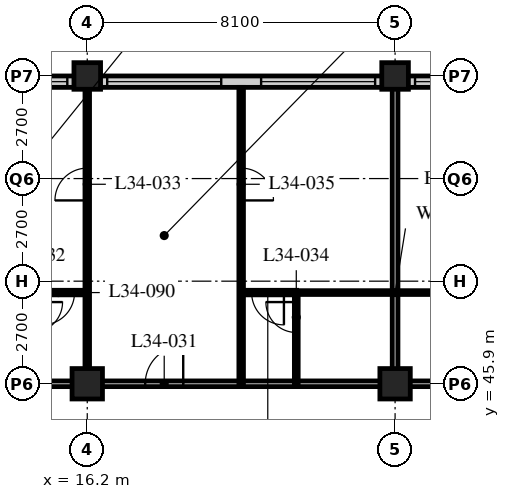
"""IFC4 building model, lengths in metres.
Left out: names, types, materials, properties, quantities, classifications, styles, units other than length and angle.
Written with IfcOpenShell. Run it as: python <this file> out.ifc"""

import sys

from ifc_helpers import new_model, si_unit, direction, frame, frame_2d, origin, origin_2d, place, context, subcontext, project, spatial, rectangle, hollow_rectangle, extrude, element, fill, save


model = new_model("IFC4")
c1 = context("Model", 3, precision=1e-05, world=origin(), true_north=direction((0.0, 1.0)))
c2 = subcontext(c1, "Body", "Model", "MODEL_VIEW")
j1 = project(units=[si_unit("LENGTHUNIT", "METRE"), si_unit("PLANEANGLEUNIT", "RADIAN")], contexts=[c1])
p1 = place(None, origin())
s1 = spatial("IfcSite", under=j1, at=p1, CompositionType="ELEMENT")
p2 = place(p1, origin())
s2 = spatial("IfcBuilding", under=s1, at=p2, CompositionType="ELEMENT")
p3 = place(p2, frame((0.0, 0.0, 134.0)))
s3 = spatial("IfcBuildingStorey", under=s2, at=p3, CompositionType="ELEMENT", Elevation=134.0)
p4 = place(p3, frame((16.2, 45.9, 0.0), z_axis=(0.0, 0.0, 1.0), x_axis=(1.0, 0.0, 0.0)))
e1 = element("IfcColumn", 1, at=p4, inside=s3, PredefinedType="COLUMN", context=c2, shape_type="SweptSolid", body=[
    extrude(hollow_rectangle(XDim=0.8, YDim=0.8, WallThickness=0.08, at=origin_2d()), origin(), (0.0, 0.0, 1.0), 3.4),
])
p5 = place(p3, frame((16.2, 54.0, 0.0), z_axis=(0.0, 0.0, 1.0), x_axis=(1.0, 0.0, 0.0)))
e2 = element("IfcColumn", 2, at=p5, inside=s3, PredefinedType="COLUMN", context=c2, shape_type="SweptSolid", body=[
    extrude(hollow_rectangle(XDim=0.7, YDim=0.7, WallThickness=0.07, at=origin_2d()), origin(), (0.0, 0.0, 1.0), 3.4),
])
p6 = place(p3, frame((24.3, 45.9, 0.0), z_axis=(0.0, 0.0, 1.0), x_axis=(1.0, 0.0, 0.0)))
e3 = element("IfcColumn", 3, at=p6, inside=s3, PredefinedType="COLUMN", context=c2, shape_type="SweptSolid", body=[
    extrude(hollow_rectangle(XDim=0.8, YDim=0.8, WallThickness=0.08, at=origin_2d()), origin(), (0.0, 0.0, 1.0), 3.4),
])
p7 = place(p3, frame((24.3, 54.0, 0.0), z_axis=(0.0, 0.0, 1.0), x_axis=(1.0, 0.0, 0.0)))
e4 = element("IfcColumn", 4, at=p7, inside=s3, PredefinedType="COLUMN", context=c2, shape_type="SweptSolid", body=[
    extrude(hollow_rectangle(XDim=0.7, YDim=0.7, WallThickness=0.07, at=origin_2d()), origin(), (0.0, 0.0, 1.0), 3.4),
])
p8 = place(p3, frame((48.3, 53.85, 0.0), z_axis=(0.0, 0.0, 1.0), x_axis=(-1.0, 0.0, 0.0)))
e5 = element("IfcWall", 5, at=p8, inside=s3, PredefinedType="SOLIDWALL", context=c2, shape_type="SweptSolid", body=[
    extrude(rectangle(XDim=40.2, YDim=0.3, at=frame_2d((20.1, 0.0))), origin(), (0.0, 0.0, 1.0), 3.19),
])
p9 = place(p8, frame((0.225, 0.0, 0.9)))
e6 = element("IfcOpeningElement", 6, at=p9, cuts=e5, PredefinedType="OPENING", context=c2, shape_type="SweptSolid", body=[
    extrude(rectangle(XDim=3.0, YDim=2.0, at=frame_2d((1.5, 1.0))), frame((0.0, 0.16, 0.0), z_axis=(0.0, -1.0, 0.0), x_axis=(1.0, 0.0, 0.0)), (0.0, 0.0, 1.0), 0.32),
])
p10 = place(p8, frame((4.275, 0.0, 0.9)))
e7 = element("IfcOpeningElement", 7, at=p10, cuts=e5, PredefinedType="OPENING", context=c2, shape_type="SweptSolid", body=[
    extrude(rectangle(XDim=3.0, YDim=2.0, at=frame_2d((1.5, 1.0))), frame((0.0, 0.16, 0.0), z_axis=(0.0, -1.0, 0.0), x_axis=(1.0, 0.0, 0.0)), (0.0, 0.0, 1.0), 0.32),
])
p11 = place(p8, frame((8.325, 0.0, 0.9)))
e8 = element("IfcOpeningElement", 8, at=p11, cuts=e5, PredefinedType="OPENING", context=c2, shape_type="SweptSolid", body=[
    extrude(rectangle(XDim=3.0, YDim=2.0, at=frame_2d((1.5, 1.0))), frame((0.0, 0.16, 0.0), z_axis=(0.0, -1.0, 0.0), x_axis=(1.0, 0.0, 0.0)), (0.0, 0.0, 1.0), 0.32),
])
p12 = place(p8, frame((12.375, 0.0, 0.9)))
e9 = element("IfcOpeningElement", 9, at=p12, cuts=e5, PredefinedType="OPENING", context=c2, shape_type="SweptSolid", body=[
    extrude(rectangle(XDim=3.0, YDim=2.0, at=frame_2d((1.5, 1.0))), frame((0.0, 0.16, 0.0), z_axis=(0.0, -1.0, 0.0), x_axis=(1.0, 0.0, 0.0)), (0.0, 0.0, 1.0), 0.32),
])
p13 = place(p8, frame((16.425, 0.0, 0.9)))
e10 = element("IfcOpeningElement", 10, at=p13, cuts=e5, PredefinedType="OPENING", context=c2, shape_type="SweptSolid", body=[
    extrude(rectangle(XDim=3.0, YDim=2.0, at=frame_2d((1.5, 1.0))), frame((0.0, 0.16, 0.0), z_axis=(0.0, -1.0, 0.0), x_axis=(1.0, 0.0, 0.0)), (0.0, 0.0, 1.0), 0.32),
])
p14 = place(p8, frame((20.475, 0.0, 0.9)))
e11 = element("IfcOpeningElement", 11, at=p14, cuts=e5, PredefinedType="OPENING", context=c2, shape_type="SweptSolid", body=[
    extrude(rectangle(XDim=3.0, YDim=2.0, at=frame_2d((1.5, 1.0))), frame((0.0, 0.16, 0.0), z_axis=(0.0, -1.0, 0.0), x_axis=(1.0, 0.0, 0.0)), (0.0, 0.0, 1.0), 0.32),
])
p15 = place(p8, frame((24.525, 0.0, 0.9)))
e12 = element("IfcOpeningElement", 12, at=p15, cuts=e5, PredefinedType="OPENING", context=c2, shape_type="SweptSolid", body=[
    extrude(rectangle(XDim=3.0, YDim=2.0, at=frame_2d((1.5, 1.0))), frame((0.0, 0.16, 0.0), z_axis=(0.0, -1.0, 0.0), x_axis=(1.0, 0.0, 0.0)), (0.0, 0.0, 1.0), 0.32),
])
p16 = place(p8, frame((28.575, 0.0, 0.9)))
e13 = element("IfcOpeningElement", 13, at=p16, cuts=e5, PredefinedType="OPENING", context=c2, shape_type="SweptSolid", body=[
    extrude(rectangle(XDim=3.0, YDim=2.0, at=frame_2d((1.5, 1.0))), frame((0.0, 0.16, 0.0), z_axis=(0.0, -1.0, 0.0), x_axis=(1.0, 0.0, 0.0)), (0.0, 0.0, 1.0), 0.32),
])
p17 = place(p8, frame((32.625, 0.0, 0.9)))
e14 = element("IfcOpeningElement", 14, at=p17, cuts=e5, PredefinedType="OPENING", context=c2, shape_type="SweptSolid", body=[
    extrude(rectangle(XDim=3.0, YDim=2.0, at=frame_2d((1.5, 1.0))), frame((0.0, 0.16, 0.0), z_axis=(0.0, -1.0, 0.0), x_axis=(1.0, 0.0, 0.0)), (0.0, 0.0, 1.0), 0.32),
])
p18 = place(p8, frame((36.675, 0.0, 0.9)))
e15 = element("IfcOpeningElement", 15, at=p18, cuts=e5, PredefinedType="OPENING", context=c2, shape_type="SweptSolid", body=[
    extrude(rectangle(XDim=3.0, YDim=2.0, at=frame_2d((1.5, 1.0))), frame((0.0, 0.16, 0.0), z_axis=(0.0, -1.0, 0.0), x_axis=(1.0, 0.0, 0.0)), (0.0, 0.0, 1.0), 0.32),
])
p19 = place(p3, frame((8.1, 45.9, 0.0), z_axis=(0.0, 0.0, 1.0), x_axis=(1.0, 0.0, 0.0)))
e16 = element("IfcWall", 16, at=p19, inside=s3, PredefinedType="PARTITIONING", context=c2, shape_type="SweptSolid", body=[
    extrude(rectangle(XDim=36.45, YDim=0.15, at=frame_2d((18.225, 0.0))), origin(), (0.0, 0.0, 1.0), 2.578),
])
p20 = place(p19, frame((9.625, 0.0, 0.0)))
e17 = element("IfcOpeningElement", 17, at=p20, cuts=e16, PredefinedType="OPENING", context=c2, shape_type="SweptSolid", body=[
    extrude(rectangle(XDim=1.0, YDim=2.1, at=frame_2d((0.5, 1.05))), frame((0.0, 0.085, 0.0), z_axis=(0.0, -1.0, 0.0), x_axis=(1.0, 0.0, 0.0)), (0.0, 0.0, 1.0), 0.17),
])
p21 = place(p19, frame((21.775, 0.0, 0.0)))
e18 = element("IfcOpeningElement", 18, at=p21, cuts=e16, PredefinedType="OPENING", context=c2, shape_type="SweptSolid", body=[
    extrude(rectangle(XDim=1.0, YDim=2.1, at=frame_2d((0.5, 1.05))), frame((0.0, 0.085, 0.0), z_axis=(0.0, -1.0, 0.0), x_axis=(1.0, 0.0, 0.0)), (0.0, 0.0, 1.0), 0.17),
])
p22 = place(p19, frame((28.95, 0.0, 0.0)))
e19 = element("IfcOpeningElement", 19, at=p22, cuts=e16, PredefinedType="OPENING", context=c2, shape_type="SweptSolid", body=[
    extrude(rectangle(XDim=1.0, YDim=2.1, at=frame_2d((0.5, 1.05))), frame((0.0, 0.085, 0.0), z_axis=(0.0, -1.0, 0.0), x_axis=(1.0, 0.0, 0.0)), (0.0, 0.0, 1.0), 0.17),
])
p23 = place(p19, frame((33.925, 0.0, 0.0)))
e20 = element("IfcOpeningElement", 20, at=p23, cuts=e16, PredefinedType="OPENING", context=c2, shape_type="SweptSolid", body=[
    extrude(rectangle(XDim=1.0, YDim=2.1, at=frame_2d((0.5, 1.05))), frame((0.0, 0.085, 0.0), z_axis=(0.0, -1.0, 0.0), x_axis=(1.0, 0.0, 0.0)), (0.0, 0.0, 1.0), 0.17),
])
p24 = place(p19, frame((2.625, 0.0, 0.0)))
e21 = element("IfcOpeningElement", 21, at=p24, cuts=e16, PredefinedType="OPENING", context=c2, shape_type="SweptSolid", body=[
    extrude(rectangle(XDim=1.0, YDim=2.1, at=frame_2d((0.5, 1.05))), frame((0.0, 0.085, 0.0), z_axis=(0.0, -1.0, 0.0), x_axis=(1.0, 0.0, 0.0)), (0.0, 0.0, 1.0), 0.17),
])
p25 = place(p3, frame((16.2, 45.9, 0.0), z_axis=(0.0, 0.0, 1.0), x_axis=(0.0, 1.0, 0.0)))
e22 = element("IfcWall", 22, at=p25, inside=s3, PredefinedType="PARTITIONING", context=c2, shape_type="SweptSolid", body=[
    extrude(rectangle(XDim=7.8, YDim=0.12, at=frame_2d((3.9, 0.0))), origin(), (0.0, 0.0, 1.0), 2.578),
])
p26 = place(p25, frame((4.825, 0.0, 0.0)))
e23 = element("IfcOpeningElement", 23, at=p26, cuts=e22, PredefinedType="OPENING", context=c2, shape_type="SweptSolid", body=[
    extrude(rectangle(XDim=0.85, YDim=2.1, at=frame_2d((0.425, 1.05))), frame((0.0, 0.07, 0.0), z_axis=(0.0, -1.0, 0.0), x_axis=(1.0, 0.0, 0.0)), (0.0, 0.0, 1.0), 0.14),
])
p27 = place(p3, frame((21.7, 48.3, 0.0), z_axis=(0.0, 0.0, 1.0), x_axis=(1.0, 0.0, 0.0)))
e24 = element("IfcWall", 24, at=p27, inside=s3, PredefinedType="PARTITIONING", context=c2, shape_type="SweptSolid", body=[
    extrude(rectangle(XDim=5.2, YDim=0.1, at=frame_2d((2.6, 0.0))), origin(), (0.0, 0.0, 1.0), 3.19),
])
p28 = place(p3, frame((21.7, 45.9, 0.0), z_axis=(0.0, 0.0, 1.0), x_axis=(0.0, 1.0, 0.0)))
e25 = element("IfcWall", 25, at=p28, inside=s3, PredefinedType="PARTITIONING", context=c2, shape_type="SweptSolid", body=[
    extrude(rectangle(XDim=2.4, YDim=0.1, at=frame_2d((1.2, 0.0))), origin(), (0.0, 0.0, 1.0), 3.19),
])
p29 = place(p28, frame((1.35, 0.0, 0.0)))
e26 = element("IfcOpeningElement", 26, at=p29, cuts=e25, PredefinedType="OPENING", context=c2, shape_type="SweptSolid", body=[
    extrude(rectangle(XDim=0.8, YDim=2.1, at=frame_2d((0.4, 1.05))), frame((0.0, 0.06, 0.0), z_axis=(0.0, -1.0, 0.0), x_axis=(1.0, 0.0, 0.0)), (0.0, 0.0, 1.0), 0.12),
])
p30 = place(p3, frame((20.25, 45.9, 0.0), z_axis=(0.0, 0.0, 1.0), x_axis=(0.0, 1.0, 0.0)))
e27 = element("IfcWall", 27, at=p30, inside=s3, PredefinedType="PARTITIONING", context=c2, shape_type="SweptSolid", body=[
    extrude(rectangle(XDim=7.8, YDim=0.12, at=frame_2d((3.9, 0.0))), origin(), (0.0, 0.0, 1.0), 3.19),
])
p31 = place(p30, frame((4.825, 0.0, 0.0)))
e28 = element("IfcOpeningElement", 28, at=p31, cuts=e27, PredefinedType="OPENING", context=c2, shape_type="SweptSolid", body=[
    extrude(rectangle(XDim=0.85, YDim=2.1, at=frame_2d((0.425, 1.05))), frame((0.0, 0.07, 0.0), z_axis=(0.0, -1.0, 0.0), x_axis=(1.0, 0.0, 0.0)), (0.0, 0.0, 1.0), 0.14),
])
p32 = place(p3, frame((24.3, 45.9, 0.0), z_axis=(0.0, 0.0, 1.0), x_axis=(0.0, 1.0, 0.0)))
e29 = element("IfcWall", 29, at=p32, inside=s3, PredefinedType="PARTITIONING", context=c2, shape_type="SweptSolid", body=[
    extrude(rectangle(XDim=7.8, YDim=0.15, at=frame_2d((3.9, 0.0))), origin(), (0.0, 0.0, 1.0), 2.578),
])
p33 = place(p3, frame((14.74, 48.3, 0.0), z_axis=(0.0, 0.0, 1.0), x_axis=(1.0, 0.0, 0.0)))
e30 = element("IfcWall", 30, at=p33, inside=s3, PredefinedType="PARTITIONING", context=c2, shape_type="SweptSolid", body=[
    extrude(rectangle(XDim=1.46, YDim=0.12, at=frame_2d((0.73, 0.0))), origin(), (0.0, 0.0, 1.0), 3.19),
])
p34 = place(p33, frame((0.275, 0.0, 0.0)))
e31 = element("IfcOpeningElement", 31, at=p34, cuts=e30, PredefinedType="OPENING", context=c2, shape_type="SweptSolid", body=[
    extrude(rectangle(XDim=0.85, YDim=2.1, at=frame_2d((0.425, 1.05))), frame((0.0, 0.07, 0.0), z_axis=(0.0, -1.0, 0.0), x_axis=(1.0, 0.0, 0.0)), (0.0, 0.0, 1.0), 0.14),
])
p35 = place(p3, frame((20.25, 48.3, 0.0), z_axis=(0.0, 0.0, 1.0), x_axis=(1.0, 0.0, 0.0)))
e32 = element("IfcWall", 32, at=p35, inside=s3, PredefinedType="PARTITIONING", context=c2, shape_type="SweptSolid", body=[
    extrude(rectangle(XDim=1.46, YDim=0.12, at=frame_2d((0.73, 0.0))), origin(), (0.0, 0.0, 1.0), 3.19),
])
p36 = place(p35, frame((0.275, 0.0, 0.0)))
e33 = element("IfcOpeningElement", 33, at=p36, cuts=e32, PredefinedType="OPENING", context=c2, shape_type="SweptSolid", body=[
    extrude(rectangle(XDim=0.85, YDim=2.1, at=frame_2d((0.425, 1.05))), frame((0.0, 0.07, 0.0), z_axis=(0.0, -1.0, 0.0), x_axis=(1.0, 0.0, 0.0)), (0.0, 0.0, 1.0), 0.14),
])
p37 = place(p14, origin())
e34 = element("IfcWindow", 34, at=p37, inside=s3, PartitioningType="SINGLE_PANEL", PredefinedType="WINDOW", context=c2, shape_type="SweptSolid", body=[
    extrude(rectangle(XDim=3.0, YDim=2.0, at=frame_2d((1.5, 1.0))), frame((0.0, 0.03, 0.0), z_axis=(0.0, -1.0, 0.0), x_axis=(1.0, 0.0, 0.0)), (0.0, 0.0, 1.0), 0.06),
])
fill(e11, e34)
p38 = place(p15, origin())
e35 = element("IfcWindow", 35, at=p38, inside=s3, PartitioningType="SINGLE_PANEL", PredefinedType="WINDOW", context=c2, shape_type="SweptSolid", body=[
    extrude(rectangle(XDim=3.0, YDim=2.0, at=frame_2d((1.5, 1.0))), frame((0.0, 0.03, 0.0), z_axis=(0.0, -1.0, 0.0), x_axis=(1.0, 0.0, 0.0)), (0.0, 0.0, 1.0), 0.06),
])
fill(e12, e35)
p39 = place(p16, origin())
e36 = element("IfcWindow", 36, at=p39, inside=s3, PartitioningType="SINGLE_PANEL", PredefinedType="WINDOW", context=c2, shape_type="SweptSolid", body=[
    extrude(rectangle(XDim=3.0, YDim=2.0, at=frame_2d((1.5, 1.0))), frame((0.0, 0.03, 0.0), z_axis=(0.0, -1.0, 0.0), x_axis=(1.0, 0.0, 0.0)), (0.0, 0.0, 1.0), 0.06),
])
fill(e13, e36)
p40 = place(p17, origin())
e37 = element("IfcWindow", 37, at=p40, inside=s3, PartitioningType="SINGLE_PANEL", PredefinedType="WINDOW", context=c2, shape_type="SweptSolid", body=[
    extrude(rectangle(XDim=3.0, YDim=2.0, at=frame_2d((1.5, 1.0))), frame((0.0, 0.03, 0.0), z_axis=(0.0, -1.0, 0.0), x_axis=(1.0, 0.0, 0.0)), (0.0, 0.0, 1.0), 0.06),
])
fill(e14, e37)
p41 = place(p20, origin())
e38 = element("IfcDoor", 38, at=p41, inside=s3, OperationType="SINGLE_SWING_RIGHT", PredefinedType="DOOR", context=c2, shape_type="SweptSolid", body=[
    extrude(rectangle(XDim=1.0, YDim=2.1, at=frame_2d((0.5, 1.05))), frame((0.0, 0.025, 0.0), z_axis=(0.0, -1.0, 0.0), x_axis=(1.0, 0.0, 0.0)), (0.0, 0.0, 1.0), 0.05),
])
fill(e17, e38)
p42 = place(p26, origin())
e39 = element("IfcDoor", 39, at=p42, inside=s3, OperationType="SINGLE_SWING_LEFT", PredefinedType="DOOR", context=c2, shape_type="SweptSolid", body=[
    extrude(rectangle(XDim=0.85, YDim=2.1, at=frame_2d((0.425, 1.05))), frame((0.0, 0.025, 0.0), z_axis=(0.0, -1.0, 0.0), x_axis=(1.0, 0.0, 0.0)), (0.0, 0.0, 1.0), 0.05),
])
fill(e23, e39)
p43 = place(p29, origin())
e40 = element("IfcDoor", 40, at=p43, inside=s3, OperationType="SINGLE_SWING_RIGHT", PredefinedType="DOOR", context=c2, shape_type="SweptSolid", body=[
    extrude(rectangle(XDim=0.8, YDim=2.1, at=frame_2d((0.4, 1.05))), frame((0.0, 0.025, 0.0), z_axis=(0.0, -1.0, 0.0), x_axis=(1.0, 0.0, 0.0)), (0.0, 0.0, 1.0), 0.05),
])
fill(e26, e40)
p44 = place(p31, origin())
e41 = element("IfcDoor", 41, at=p44, inside=s3, OperationType="SINGLE_SWING_RIGHT", PredefinedType="DOOR", context=c2, shape_type="SweptSolid", body=[
    extrude(rectangle(XDim=0.85, YDim=2.1, at=frame_2d((0.425, 1.05))), frame((0.0, 0.025, 0.0), z_axis=(0.0, -1.0, 0.0), x_axis=(1.0, 0.0, 0.0)), (0.0, 0.0, 1.0), 0.05),
])
fill(e28, e41)
p45 = place(p34, origin())
e42 = element("IfcDoor", 42, at=p45, inside=s3, OperationType="SINGLE_SWING_RIGHT", PredefinedType="DOOR", context=c2, shape_type="SweptSolid", body=[
    extrude(rectangle(XDim=0.85, YDim=2.1, at=frame_2d((0.425, 1.05))), frame((0.0, 0.025, 0.0), z_axis=(0.0, -1.0, 0.0), x_axis=(1.0, 0.0, 0.0)), (0.0, 0.0, 1.0), 0.05),
])
fill(e31, e42)
p46 = place(p36, origin())
e43 = element("IfcDoor", 43, at=p46, inside=s3, OperationType="SINGLE_SWING_LEFT", PredefinedType="DOOR", context=c2, shape_type="SweptSolid", body=[
    extrude(rectangle(XDim=0.85, YDim=2.1, at=frame_2d((0.425, 1.05))), frame((0.0, 0.025, 0.0), z_axis=(0.0, -1.0, 0.0), x_axis=(1.0, 0.0, 0.0)), (0.0, 0.0, 1.0), 0.05),
])
fill(e33, e43)
save(model, sys.argv[1])
